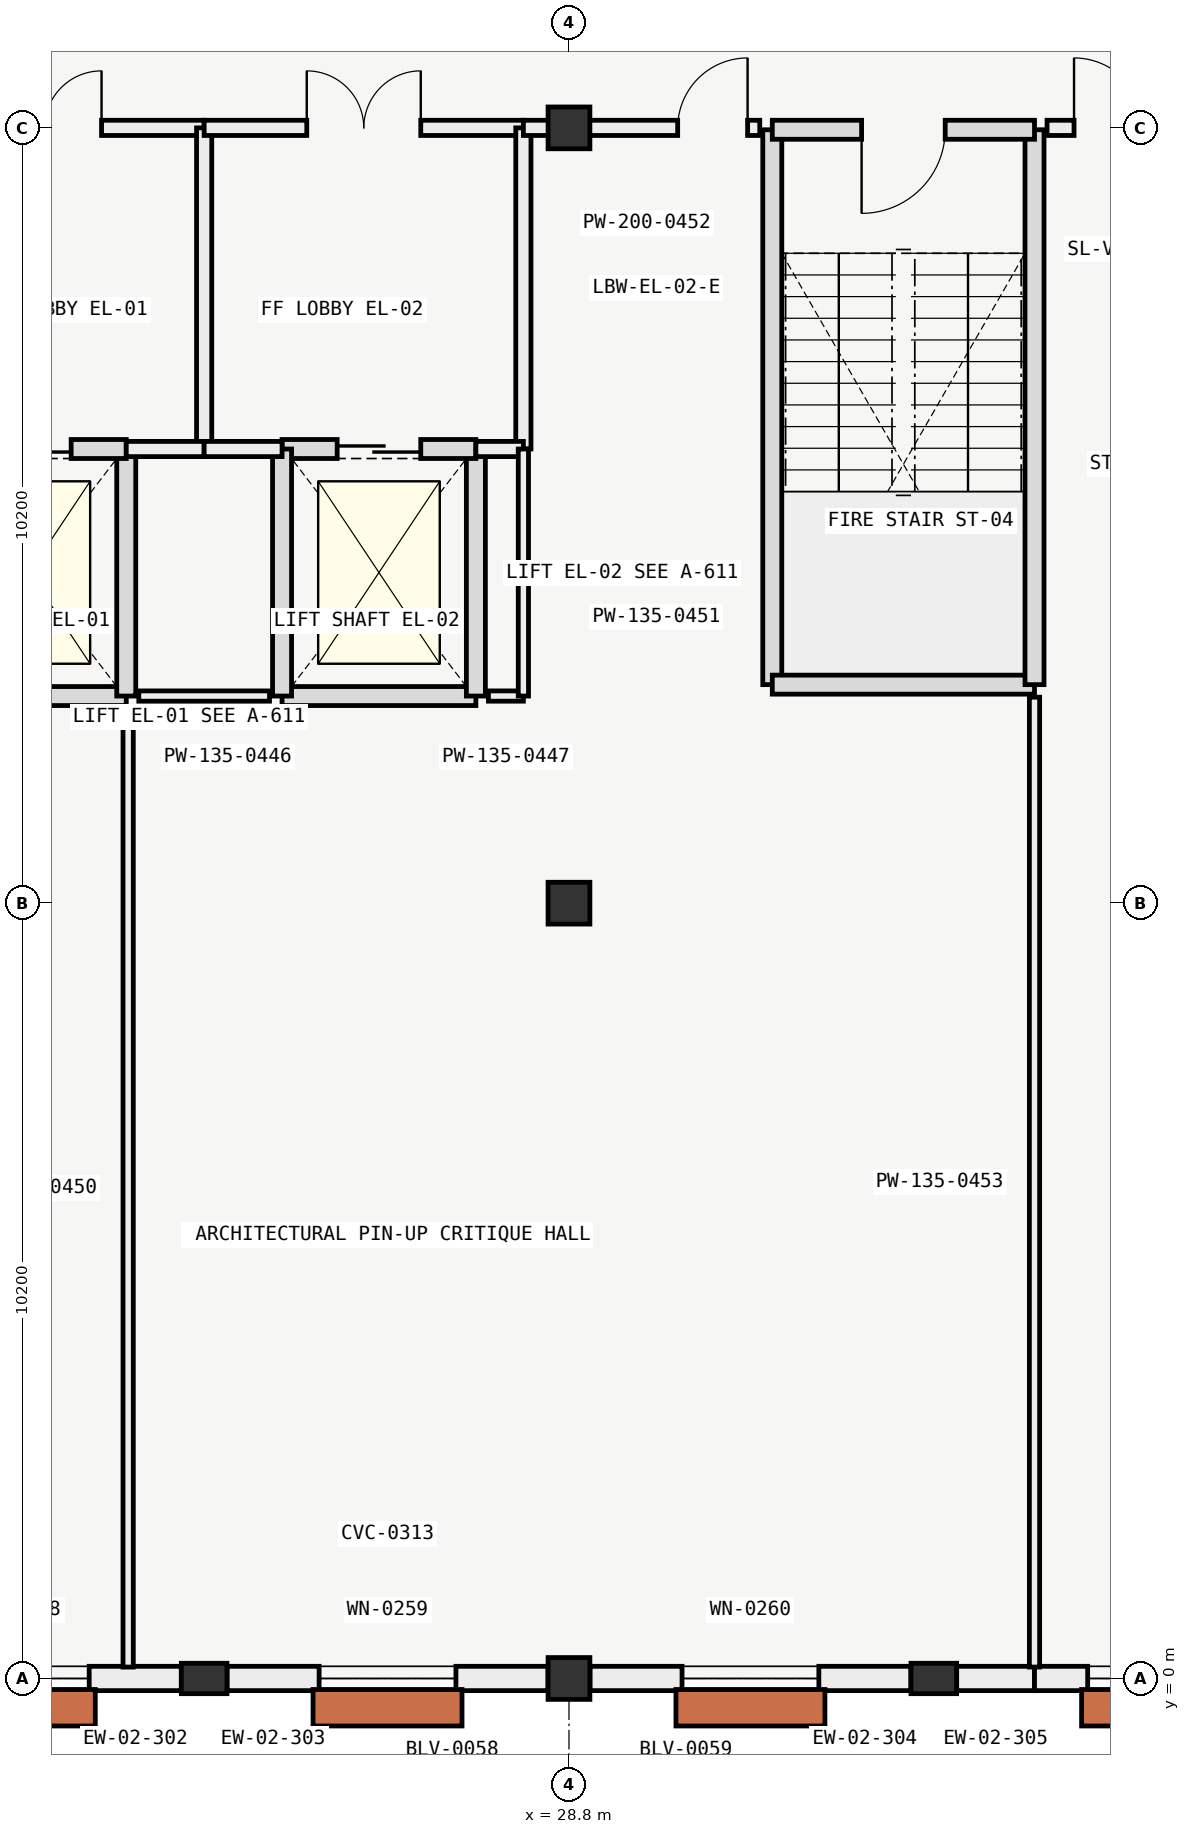
"""IFC4 building model, lengths in metres.
Left out: names, types, materials, properties, quantities, classifications, styles, units other than length and angle.
Written with IfcOpenShell. Run it as: python <this file> out.ifc"""

import sys

from ifc_helpers import new_model, si_unit, direction, frame, frame_2d, origin, origin_2d, place, context, subcontext, project, spatial, rectangle, extrude, element, fill, save


model = new_model("IFC4")
c1 = context("Model", 3, precision=1e-05, world=origin(), true_north=direction((0.0, 1.0)))
c2 = subcontext(c1, "Body", "Model", "MODEL_VIEW")
j1 = project(units=[si_unit("LENGTHUNIT", "METRE"), si_unit("PLANEANGLEUNIT", "RADIAN")], contexts=[c1])
p1 = place(None, origin())
s1 = spatial("IfcSite", under=j1, at=p1, CompositionType="ELEMENT")
p2 = place(p1, origin())
s2 = spatial("IfcBuilding", under=s1, at=p2, CompositionType="ELEMENT")
p3 = place(p2, frame((0.0, 0.0, 22.2)))
s3 = spatial("IfcBuildingStorey", under=s2, at=p3, CompositionType="ELEMENT", Elevation=22.2)
for number, where, z_axis, x_axis in (
    (1, (28.8, 0.0, 0.0), (0.0, 0.0, 1.0), (1.0, 0.0, 0.0)),
    (2, (28.8, 10.2, 0.0), (0.0, 0.0, 1.0), (1.0, 0.0, 0.0)),
    (3, (28.8, 20.4, 0.0), (0.0, 0.0, 1.0), (1.0, 0.0, 0.0)),
):
    element("IfcColumn", number, at=place(p3, frame(where, z_axis=z_axis, x_axis=x_axis)), inside=s3, PredefinedType="COLUMN", context=c2, shape_type="SweptSolid", body=[
        extrude(rectangle(XDim=0.55, YDim=0.55, at=origin_2d()), origin(), (0.0, 0.0, 1.0), 4.2),
    ])
for number, where, z_axis, x_axis in (
    (4, (24.0, 0.0, 0.0), (0.0, 0.0, 1.0), (0.0, 1.0, 0.0)),
    (5, (33.6, 0.0, 0.0), (0.0, 0.0, 1.0), (0.0, 1.0, 0.0)),
):
    element("IfcColumn", number, at=place(p3, frame(where, z_axis=z_axis, x_axis=x_axis)), inside=s3, PredefinedType="PILASTER", context=c2, shape_type="SweptSolid", body=[
        extrude(rectangle(XDim=0.4, YDim=0.6, at=origin_2d()), origin(), (0.0, 0.0, 1.0), 4.2),
    ])
p4 = place(p3, frame((23.699, 0.0, 0.0), z_axis=(0.0, 0.0, 1.0), x_axis=(-1.0, 0.0, 0.0)))
e6 = element("IfcWall", 6, at=p4, inside=s3, PredefinedType="SOLIDWALL", context=c2, shape_type="SweptSolid", body=[
    extrude(rectangle(XDim=4.223, YDim=0.32, at=frame_2d((2.111, 0.0))), origin(), (0.0, 0.0, 1.0), 3.3),
])
p5 = place(p4, frame((1.211, 0.0, 0.8)))
e7 = element("IfcOpeningElement", 7, at=p5, cuts=e6, PredefinedType="OPENING", context=c2, shape_type="SweptSolid", body=[
    extrude(rectangle(XDim=1.8, YDim=2.1, at=frame_2d((0.9, 1.05))), frame((0.0, 0.17, 0.0), z_axis=(0.0, -1.0, 0.0), x_axis=(1.0, 0.0, 0.0)), (0.0, 0.0, 1.0), 0.34),
])
p6 = place(p3, frame((28.524, 0.0, 0.0), z_axis=(0.0, 0.0, 1.0), x_axis=(-1.0, 0.0, 0.0)))
e8 = element("IfcWall", 8, at=p6, inside=s3, PredefinedType="SOLIDWALL", context=c2, shape_type="SweptSolid", body=[
    extrude(rectangle(XDim=4.223, YDim=0.32, at=frame_2d((2.111, 0.0))), origin(), (0.0, 0.0, 1.0), 3.3),
])
p7 = place(p6, frame((1.211, 0.0, 0.8)))
e9 = element("IfcOpeningElement", 9, at=p7, cuts=e8, PredefinedType="OPENING", context=c2, shape_type="SweptSolid", body=[
    extrude(rectangle(XDim=1.8, YDim=2.1, at=frame_2d((0.9, 1.05))), frame((0.0, 0.17, 0.0), z_axis=(0.0, -1.0, 0.0), x_axis=(1.0, 0.0, 0.0)), (0.0, 0.0, 1.0), 0.34),
])
p8 = place(p3, frame((33.299, 0.0, 0.0), z_axis=(0.0, 0.0, 1.0), x_axis=(-1.0, 0.0, 0.0)))
e10 = element("IfcWall", 10, at=p8, inside=s3, PredefinedType="SOLIDWALL", context=c2, shape_type="SweptSolid", body=[
    extrude(rectangle(XDim=4.223, YDim=0.32, at=frame_2d((2.112, 0.0))), origin(), (0.0, 0.0, 1.0), 3.3),
])
p9 = place(p8, frame((1.211, 0.0, 0.8)))
e11 = element("IfcOpeningElement", 11, at=p9, cuts=e10, PredefinedType="OPENING", context=c2, shape_type="SweptSolid", body=[
    extrude(rectangle(XDim=1.8, YDim=2.1, at=frame_2d((0.9, 1.05))), frame((0.0, 0.17, 0.0), z_axis=(0.0, -1.0, 0.0), x_axis=(1.0, 0.0, 0.0)), (0.0, 0.0, 1.0), 0.34),
])
p10 = place(p3, frame((34.925, 0.0, 0.0), z_axis=(0.0, 0.0, 1.0), x_axis=(-1.0, 0.0, 0.0)))
e12 = element("IfcWall", 12, at=p10, inside=s3, PredefinedType="SOLIDWALL", context=c2, shape_type="SweptSolid", body=[
    extrude(rectangle(XDim=1.024, YDim=0.32, at=frame_2d((0.512, 0.0))), origin(), (0.0, 0.0, 1.0), 3.3),
])
p11 = place(p3, frame((38.124, 0.0, 0.0), z_axis=(0.0, 0.0, 1.0), x_axis=(-1.0, 0.0, 0.0)))
e13 = element("IfcWall", 13, at=p11, inside=s3, PredefinedType="SOLIDWALL", context=c2, shape_type="SweptSolid", body=[
    extrude(rectangle(XDim=3.199, YDim=0.32, at=frame_2d((1.6, 0.0))), origin(), (0.0, 0.0, 1.0), 3.3),
])
p12 = place(p11, frame((0.699, 0.0, 0.8)))
e14 = element("IfcOpeningElement", 14, at=p12, cuts=e13, PredefinedType="OPENING", context=c2, shape_type="SweptSolid", body=[
    extrude(rectangle(XDim=1.8, YDim=2.1, at=frame_2d((0.9, 1.05))), frame((0.0, 0.17, 0.0), z_axis=(0.0, -1.0, 0.0), x_axis=(1.0, 0.0, 0.0)), (0.0, 0.0, 1.0), 0.34),
])
p13 = place(p3, frame((31.475, 20.375, 0.0), z_axis=(0.0, 0.0, 1.0), x_axis=(0.0, -1.0, 0.0)))
e15 = element("IfcWall", 15, at=p13, inside=s3, PredefinedType="SOLIDWALL", context=c2, shape_type="SweptSolid", body=[
    extrude(rectangle(XDim=7.3, YDim=0.25, at=frame_2d((3.65, 0.0))), origin(), (0.0, 0.0, 1.0), 3.975),
])
p14 = place(p3, frame((31.475, 13.075, 0.0), z_axis=(0.0, 0.0, 1.0), x_axis=(1.0, 0.0, 0.0)))
e16 = element("IfcWall", 16, at=p14, inside=s3, PredefinedType="SOLIDWALL", context=c2, shape_type="SweptSolid", body=[
    extrude(rectangle(XDim=3.45, YDim=0.25, at=frame_2d((1.725, 0.0))), origin(), (0.0, 0.0, 1.0), 3.975),
])
p15 = place(p3, frame((34.925, 13.075, 0.0), z_axis=(0.0, 0.0, 1.0), x_axis=(0.0, 1.0, 0.0)))
e17 = element("IfcWall", 17, at=p15, inside=s3, PredefinedType="SOLIDWALL", context=c2, shape_type="SweptSolid", body=[
    extrude(rectangle(XDim=7.3, YDim=0.25, at=frame_2d((3.65, 0.0))), origin(), (0.0, 0.0, 1.0), 3.975),
])
p16 = place(p3, frame((34.925, 20.375, 0.0), z_axis=(0.0, 0.0, 1.0), x_axis=(-1.0, 0.0, 0.0)))
e18 = element("IfcWall", 18, at=p16, inside=s3, PredefinedType="SOLIDWALL", context=c2, shape_type="SweptSolid", body=[
    extrude(rectangle(XDim=3.45, YDim=0.25, at=frame_2d((1.725, 0.0))), origin(), (0.0, 0.0, 1.0), 3.975),
])
p17 = place(p16, frame((1.175, 0.0, 0.0)))
e19 = element("IfcOpeningElement", 19, at=p17, cuts=e18, PredefinedType="OPENING", context=c2, shape_type="SweptSolid", body=[
    extrude(rectangle(XDim=1.1, YDim=2.2, at=frame_2d((0.55, 1.1))), frame((0.0, 0.135, 0.0), z_axis=(0.0, -1.0, 0.0), x_axis=(1.0, 0.0, 0.0)), (0.0, 0.0, 1.0), 0.27),
])
p18 = place(p3, frame((20.425, 12.925, 0.0), z_axis=(0.0, 0.0, 1.0), x_axis=(1.0, 0.0, 0.0)))
e20 = element("IfcWall", 20, at=p18, inside=s3, PredefinedType="SOLIDWALL", context=c2, shape_type="SweptSolid", body=[
    extrude(rectangle(XDim=2.55, YDim=0.25, at=frame_2d((1.275, 0.0))), origin(), (0.0, 0.0, 1.0), 3.975),
])
p19 = place(p3, frame((22.975, 12.925, 0.0), z_axis=(0.0, 0.0, 1.0), x_axis=(0.0, 1.0, 0.0)))
e21 = element("IfcWall", 21, at=p19, inside=s3, PredefinedType="SOLIDWALL", context=c2, shape_type="SweptSolid", body=[
    extrude(rectangle(XDim=3.25, YDim=0.25, at=frame_2d((1.625, 0.0))), origin(), (0.0, 0.0, 1.0), 3.975),
])
p20 = place(p3, frame((22.975, 16.175, 0.0), z_axis=(0.0, 0.0, 1.0), x_axis=(-1.0, 0.0, 0.0)))
e22 = element("IfcWall", 22, at=p20, inside=s3, PredefinedType="SOLIDWALL", context=c2, shape_type="SweptSolid", body=[
    extrude(rectangle(XDim=2.55, YDim=0.25, at=frame_2d((1.275, 0.0))), origin(), (0.0, 0.0, 1.0), 3.975),
])
p21 = place(p20, frame((0.725, 0.0, 0.0)))
e23 = element("IfcOpeningElement", 23, at=p21, cuts=e22, PredefinedType="OPENING", context=c2, shape_type="SweptSolid", body=[
    extrude(rectangle(XDim=1.1, YDim=2.1, at=frame_2d((0.55, 1.05))), frame((0.0, 0.135, 0.0), z_axis=(0.0, -1.0, 0.0), x_axis=(1.0, 0.0, 0.0)), (0.0, 0.0, 1.0), 0.27),
])
p22 = place(p3, frame((19.8, 20.4, 0.0), z_axis=(0.0, 0.0, 1.0), x_axis=(1.0, 0.0, 0.0)))
e24 = element("IfcWall", 24, at=p22, inside=s3, PredefinedType="PARTITIONING", context=c2, shape_type="SweptSolid", body=[
    extrude(rectangle(XDim=4.2, YDim=0.2, at=frame_2d((2.1, 0.0))), origin(), (0.0, 0.0, 1.0), 3.405),
])
p23 = place(p22, frame((1.35, 0.0, 0.0)))
e25 = element("IfcOpeningElement", 25, at=p23, cuts=e24, PredefinedType="OPENING", context=c2, shape_type="SweptSolid", body=[
    extrude(rectangle(XDim=1.5, YDim=2.2, at=frame_2d((0.75, 1.1))), frame((0.0, 0.11, 0.0), z_axis=(0.0, -1.0, 0.0), x_axis=(1.0, 0.0, 0.0)), (0.0, 0.0, 1.0), 0.22),
])
p24 = place(p3, frame((24.0, 16.175, 0.0), z_axis=(0.0, 0.0, 1.0), x_axis=(0.0, 1.0, 0.0)))
e26 = element("IfcWall", 26, at=p24, inside=s3, PredefinedType="PARTITIONING", context=c2, shape_type="SweptSolid", body=[
    extrude(rectangle(XDim=4.225, YDim=0.2, at=frame_2d((2.112, 0.0))), origin(), (0.0, 0.0, 1.0), 3.405),
])
p25 = place(p3, frame((22.975, 16.175, 0.0), z_axis=(0.0, 0.0, 1.0), x_axis=(1.0, 0.0, 0.0)))
e27 = element("IfcWall", 27, at=p25, inside=s3, PredefinedType="PARTITIONING", context=c2, shape_type="SweptSolid", body=[
    extrude(rectangle(XDim=1.025, YDim=0.2, at=frame_2d((0.512, 0.0))), origin(), (0.0, 0.0, 1.0), 3.55),
])
p26 = place(p3, frame((25.025, 12.925, 0.0), z_axis=(0.0, 0.0, 1.0), x_axis=(1.0, 0.0, 0.0)))
e28 = element("IfcWall", 28, at=p26, inside=s3, PredefinedType="SOLIDWALL", context=c2, shape_type="SweptSolid", body=[
    extrude(rectangle(XDim=2.55, YDim=0.25, at=frame_2d((1.275, 0.0))), origin(), (0.0, 0.0, 1.0), 3.975),
])
p27 = place(p3, frame((27.575, 12.925, 0.0), z_axis=(0.0, 0.0, 1.0), x_axis=(0.0, 1.0, 0.0)))
e29 = element("IfcWall", 29, at=p27, inside=s3, PredefinedType="SOLIDWALL", context=c2, shape_type="SweptSolid", body=[
    extrude(rectangle(XDim=3.25, YDim=0.25, at=frame_2d((1.625, 0.0))), origin(), (0.0, 0.0, 1.0), 3.975),
])
p28 = place(p3, frame((27.575, 16.175, 0.0), z_axis=(0.0, 0.0, 1.0), x_axis=(-1.0, 0.0, 0.0)))
e30 = element("IfcWall", 30, at=p28, inside=s3, PredefinedType="SOLIDWALL", context=c2, shape_type="SweptSolid", body=[
    extrude(rectangle(XDim=2.55, YDim=0.25, at=frame_2d((1.275, 0.0))), origin(), (0.0, 0.0, 1.0), 3.975),
])
p29 = place(p28, frame((0.725, 0.0, 0.0)))
e31 = element("IfcOpeningElement", 31, at=p29, cuts=e30, PredefinedType="OPENING", context=c2, shape_type="SweptSolid", body=[
    extrude(rectangle(XDim=1.1, YDim=2.1, at=frame_2d((0.55, 1.05))), frame((0.0, 0.135, 0.0), z_axis=(0.0, -1.0, 0.0), x_axis=(1.0, 0.0, 0.0)), (0.0, 0.0, 1.0), 0.27),
])
p30 = place(p3, frame((25.025, 16.175, 0.0), z_axis=(0.0, 0.0, 1.0), x_axis=(0.0, -1.0, 0.0)))
e32 = element("IfcWall", 32, at=p30, inside=s3, PredefinedType="SOLIDWALL", context=c2, shape_type="SweptSolid", body=[
    extrude(rectangle(XDim=3.25, YDim=0.25, at=frame_2d((1.625, 0.0))), origin(), (0.0, 0.0, 1.0), 3.975),
])
p31 = place(p3, frame((24.0, 20.4, 0.0), z_axis=(0.0, 0.0, 1.0), x_axis=(1.0, 0.0, 0.0)))
e33 = element("IfcWall", 33, at=p31, inside=s3, PredefinedType="PARTITIONING", context=c2, shape_type="SweptSolid", body=[
    extrude(rectangle(XDim=4.2, YDim=0.2, at=frame_2d((2.1, 0.0))), origin(), (0.0, 0.0, 1.0), 3.405),
])
p32 = place(p31, frame((1.35, 0.0, 0.0)))
e34 = element("IfcOpeningElement", 34, at=p32, cuts=e33, PredefinedType="OPENING", context=c2, shape_type="SweptSolid", body=[
    extrude(rectangle(XDim=1.5, YDim=2.2, at=frame_2d((0.75, 1.1))), frame((0.0, 0.11, 0.0), z_axis=(0.0, -1.0, 0.0), x_axis=(1.0, 0.0, 0.0)), (0.0, 0.0, 1.0), 0.22),
])
p33 = place(p3, frame((28.2, 16.175, 0.0), z_axis=(0.0, 0.0, 1.0), x_axis=(0.0, 1.0, 0.0)))
e35 = element("IfcWall", 35, at=p33, inside=s3, PredefinedType="PARTITIONING", context=c2, shape_type="SweptSolid", body=[
    extrude(rectangle(XDim=4.225, YDim=0.2, at=frame_2d((2.112, 0.0))), origin(), (0.0, 0.0, 1.0), 3.405),
])
p34 = place(p3, frame((24.0, 16.175, 0.0), z_axis=(0.0, 0.0, 1.0), x_axis=(1.0, 0.0, 0.0)))
e36 = element("IfcWall", 36, at=p34, inside=s3, PredefinedType="PARTITIONING", context=c2, shape_type="SweptSolid", body=[
    extrude(rectangle(XDim=1.025, YDim=0.2, at=frame_2d((0.512, 0.0))), origin(), (0.0, 0.0, 1.0), 3.55),
])
p35 = place(p3, frame((27.575, 16.175, 0.0), z_axis=(0.0, 0.0, 1.0), x_axis=(1.0, 0.0, 0.0)))
e37 = element("IfcWall", 37, at=p35, inside=s3, PredefinedType="PARTITIONING", context=c2, shape_type="SweptSolid", body=[
    extrude(rectangle(XDim=0.625, YDim=0.2, at=frame_2d((0.312, 0.0))), origin(), (0.0, 0.0, 1.0), 3.55),
])
p36 = place(p3, frame((23.14, 12.925, 0.0), z_axis=(0.0, 0.0, 1.0), x_axis=(1.0, 0.0, 0.0)))
e38 = element("IfcWall", 38, at=p36, inside=s3, PredefinedType="PARTITIONING", context=c2, shape_type="SweptSolid", body=[
    extrude(rectangle(XDim=1.72, YDim=0.135, at=frame_2d((0.86, 0.0))), origin(), (0.0, 0.0, 1.0), 3.85),
])
p37 = place(p3, frame((27.74, 12.925, 0.0), z_axis=(0.0, 0.0, 1.0), x_axis=(1.0, 0.0, 0.0)))
e39 = element("IfcWall", 39, at=p37, inside=s3, PredefinedType="PARTITIONING", context=c2, shape_type="SweptSolid", body=[
    extrude(rectangle(XDim=0.46, YDim=0.135, at=frame_2d((0.23, 0.0))), origin(), (0.0, 0.0, 1.0), 3.85),
])
p38 = place(p3, frame((23.0, 0.15, 0.0), z_axis=(0.0, 0.0, 1.0), x_axis=(0.0, 1.0, 0.0)))
e40 = element("IfcWall", 40, at=p38, inside=s3, PredefinedType="PARTITIONING", context=c2, shape_type="SweptSolid", body=[
    extrude(rectangle(XDim=12.61, YDim=0.135, at=frame_2d((6.305, 0.0))), origin(), (0.0, 0.0, 1.0), 3.405),
])
p39 = place(p3, frame((28.2, 12.925, 0.0), z_axis=(0.0, 0.0, 1.0), x_axis=(0.0, 1.0, 0.0)))
e41 = element("IfcWall", 41, at=p39, inside=s3, PredefinedType="PARTITIONING", context=c2, shape_type="SweptSolid", body=[
    extrude(rectangle(XDim=3.25, YDim=0.135, at=frame_2d((1.625, 0.0))), origin(), (0.0, 0.0, 1.0), 3.85),
])
p40 = place(p3, frame((28.2, 20.4, 0.0), z_axis=(0.0, 0.0, 1.0), x_axis=(1.0, 0.0, 0.0)))
e42 = element("IfcWall", 42, at=p40, inside=s3, PredefinedType="PARTITIONING", context=c2, shape_type="SweptSolid", body=[
    extrude(rectangle(XDim=3.11, YDim=0.2, at=frame_2d((1.555, 0.0))), origin(), (0.0, 0.0, 1.0), 3.305),
])
p41 = place(p40, frame((2.03, 0.0, 0.0)))
e43 = element("IfcOpeningElement", 43, at=p41, cuts=e42, PredefinedType="OPENING", context=c2, shape_type="SweptSolid", body=[
    extrude(rectangle(XDim=0.92, YDim=2.1, at=frame_2d((0.46, 1.05))), frame((0.0, 0.11, 0.0), z_axis=(0.0, -1.0, 0.0), x_axis=(1.0, 0.0, 0.0)), (0.0, 0.0, 1.0), 0.22),
])
p42 = place(p3, frame((34.925, 0.15, 0.0), z_axis=(0.0, 0.0, 1.0), x_axis=(0.0, 1.0, 0.0)))
e44 = element("IfcWall", 44, at=p42, inside=s3, PredefinedType="PARTITIONING", context=c2, shape_type="SweptSolid", body=[
    extrude(rectangle(XDim=12.76, YDim=0.135, at=frame_2d((6.38, 0.0))), origin(), (0.0, 0.0, 1.0), 3.405),
])
p43 = place(p3, frame((35.09, 20.4, 0.0), z_axis=(0.0, 0.0, 1.0), x_axis=(1.0, 0.0, 0.0)))
e45 = element("IfcWall", 45, at=p43, inside=s3, PredefinedType="PARTITIONING", context=c2, shape_type="SweptSolid", body=[
    extrude(rectangle(XDim=9.56, YDim=0.2, at=frame_2d((4.78, 0.0))), origin(), (0.0, 0.0, 1.0), 3.305),
])
p44 = place(p43, frame((0.355, 0.0, 0.0)))
e46 = element("IfcOpeningElement", 46, at=p44, cuts=e45, PredefinedType="OPENING", context=c2, shape_type="SweptSolid", body=[
    extrude(rectangle(XDim=0.92, YDim=2.1, at=frame_2d((0.46, 1.05))), frame((0.0, 0.11, 0.0), z_axis=(0.0, -1.0, 0.0), x_axis=(1.0, 0.0, 0.0)), (0.0, 0.0, 1.0), 0.22),
])
p45 = place(p5, origin())
e47 = element("IfcWindow", 47, at=p45, inside=s3, PartitioningType="SINGLE_PANEL", PredefinedType="WINDOW", context=c2, shape_type="SweptSolid", body=[
    extrude(rectangle(XDim=1.8, YDim=2.1, at=frame_2d((0.9, 1.05))), frame((0.0, 0.03, 0.0), z_axis=(0.0, -1.0, 0.0), x_axis=(1.0, 0.0, 0.0)), (0.0, 0.0, 1.0), 0.06),
])
fill(e7, e47)
p46 = place(p7, origin())
e48 = element("IfcWindow", 48, at=p46, inside=s3, PartitioningType="SINGLE_PANEL", PredefinedType="WINDOW", context=c2, shape_type="SweptSolid", body=[
    extrude(rectangle(XDim=1.8, YDim=2.1, at=frame_2d((0.9, 1.05))), frame((0.0, 0.03, 0.0), z_axis=(0.0, -1.0, 0.0), x_axis=(1.0, 0.0, 0.0)), (0.0, 0.0, 1.0), 0.06),
])
fill(e9, e48)
p47 = place(p9, origin())
e49 = element("IfcWindow", 49, at=p47, inside=s3, PartitioningType="SINGLE_PANEL", PredefinedType="WINDOW", context=c2, shape_type="SweptSolid", body=[
    extrude(rectangle(XDim=1.8, YDim=2.1, at=frame_2d((0.9, 1.05))), frame((0.0, 0.03, 0.0), z_axis=(0.0, -1.0, 0.0), x_axis=(1.0, 0.0, 0.0)), (0.0, 0.0, 1.0), 0.06),
])
fill(e11, e49)
p48 = place(p12, origin())
e50 = element("IfcWindow", 50, at=p48, inside=s3, PartitioningType="SINGLE_PANEL", PredefinedType="WINDOW", context=c2, shape_type="SweptSolid", body=[
    extrude(rectangle(XDim=1.8, YDim=2.1, at=frame_2d((0.9, 1.05))), frame((0.0, 0.03, 0.0), z_axis=(0.0, -1.0, 0.0), x_axis=(1.0, 0.0, 0.0)), (0.0, 0.0, 1.0), 0.06),
])
fill(e14, e50)
p49 = place(p17, origin())
e51 = element("IfcDoor", 51, at=p49, inside=s3, OperationType="SINGLE_SWING_RIGHT", PredefinedType="DOOR", context=c2, shape_type="SweptSolid", body=[
    extrude(rectangle(XDim=1.1, YDim=2.2, at=frame_2d((0.55, 1.1))), frame((0.0, 0.025, 0.0), z_axis=(0.0, -1.0, 0.0), x_axis=(1.0, 0.0, 0.0)), (0.0, 0.0, 1.0), 0.05),
])
fill(e19, e51)
p50 = place(p21, origin())
e52 = element("IfcDoor", 52, at=p50, inside=s3, OperationType="SLIDING_TO_LEFT", PredefinedType="DOOR", context=c2, shape_type="SweptSolid", body=[
    extrude(rectangle(XDim=1.1, YDim=2.1, at=frame_2d((0.55, 1.05))), frame((0.0, 0.025, 0.0), z_axis=(0.0, -1.0, 0.0), x_axis=(1.0, 0.0, 0.0)), (0.0, 0.0, 1.0), 0.05),
])
fill(e23, e52)
p51 = place(p23, origin())
e53 = element("IfcDoor", 53, at=p51, inside=s3, OperationType="SINGLE_SWING_LEFT", PredefinedType="DOOR", context=c2, shape_type="SweptSolid", body=[
    extrude(rectangle(XDim=1.5, YDim=2.2, at=frame_2d((0.75, 1.1))), frame((0.0, 0.025, 0.0), z_axis=(0.0, -1.0, 0.0), x_axis=(1.0, 0.0, 0.0)), (0.0, 0.0, 1.0), 0.05),
])
fill(e25, e53)
p52 = place(p29, origin())
e54 = element("IfcDoor", 54, at=p52, inside=s3, OperationType="SLIDING_TO_LEFT", PredefinedType="DOOR", context=c2, shape_type="SweptSolid", body=[
    extrude(rectangle(XDim=1.1, YDim=2.1, at=frame_2d((0.55, 1.05))), frame((0.0, 0.025, 0.0), z_axis=(0.0, -1.0, 0.0), x_axis=(1.0, 0.0, 0.0)), (0.0, 0.0, 1.0), 0.05),
])
fill(e31, e54)
p53 = place(p32, origin())
e55 = element("IfcDoor", 55, at=p53, inside=s3, OperationType="SINGLE_SWING_LEFT", PredefinedType="DOOR", context=c2, shape_type="SweptSolid", body=[
    extrude(rectangle(XDim=1.5, YDim=2.2, at=frame_2d((0.75, 1.1))), frame((0.0, 0.025, 0.0), z_axis=(0.0, -1.0, 0.0), x_axis=(1.0, 0.0, 0.0)), (0.0, 0.0, 1.0), 0.05),
])
fill(e34, e55)
p54 = place(p41, origin())
e56 = element("IfcDoor", 56, at=p54, inside=s3, OperationType="SINGLE_SWING_RIGHT", PredefinedType="DOOR", context=c2, shape_type="SweptSolid", body=[
    extrude(rectangle(XDim=0.92, YDim=2.1, at=frame_2d((0.46, 1.05))), frame((0.0, 0.025, 0.0), z_axis=(0.0, -1.0, 0.0), x_axis=(1.0, 0.0, 0.0)), (0.0, 0.0, 1.0), 0.05),
])
fill(e43, e56)
p55 = place(p44, origin())
e57 = element("IfcDoor", 57, at=p55, inside=s3, OperationType="SINGLE_SWING_LEFT", PredefinedType="DOOR", context=c2, shape_type="SweptSolid", body=[
    extrude(rectangle(XDim=0.92, YDim=2.1, at=frame_2d((0.46, 1.05))), frame((0.0, 0.025, 0.0), z_axis=(0.0, -1.0, 0.0), x_axis=(1.0, 0.0, 0.0)), (0.0, 0.0, 1.0), 0.05),
])
fill(e46, e57)
save(model, sys.argv[1])
